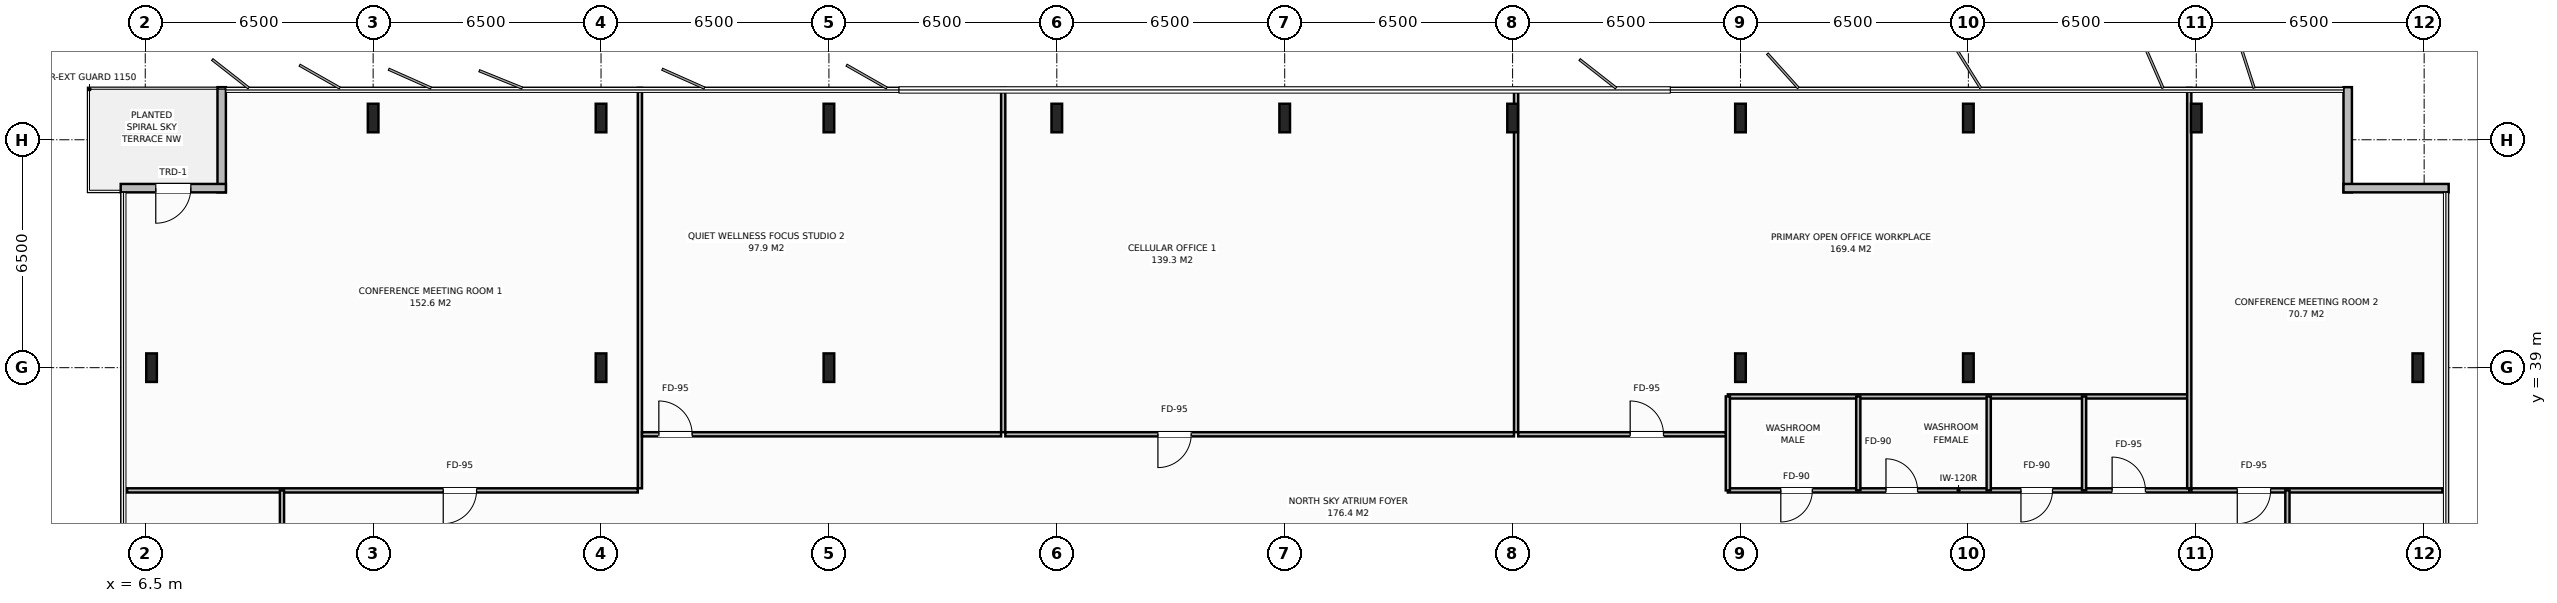
"""IFC4 building model, lengths in metres.
Left out: names, types, materials, properties, quantities, classifications, styles, units other than length and angle.
Written with IfcOpenShell. Run it as: python <this file> out.ifc"""

import sys

from ifc_helpers import new_model, si_unit, direction, frame, frame_2d, origin, origin_2d, place, context, subcontext, project, spatial, rectangle, i_section, extrude, element, fill, save


model = new_model("IFC4")
c1 = context("Model", 3, precision=1e-05, world=origin(), true_north=direction((0.0, 1.0)))
c2 = subcontext(c1, "Body", "Model", "MODEL_VIEW")
j1 = project(units=[si_unit("LENGTHUNIT", "METRE"), si_unit("PLANEANGLEUNIT", "RADIAN")], contexts=[c1])
p1 = place(None, origin())
s1 = spatial("IfcSite", under=j1, at=p1, CompositionType="ELEMENT")
p2 = place(p1, origin())
s2 = spatial("IfcBuilding", under=s1, at=p2, CompositionType="ELEMENT")
p3 = place(p2, frame((0.0, 0.0, 210.0)))
s3 = spatial("IfcBuildingStorey", under=s2, at=p3, CompositionType="ELEMENT", Elevation=210.0)
for number, where, z_axis, x_axis in (
    (1, (19.5, 39.0, 0.0), (0.0, 0.0, 1.0), (1.0, 0.0, 0.0)),
    (2, (58.5, 39.0, 0.0), (0.0, 0.0, 1.0), (1.0, 0.0, 0.0)),
    (3, (26.0, 39.0, 0.0), (0.0, 0.0, 1.0), (1.0, 0.0, 0.0)),
    (4, (52.0, 39.0, 0.0), (0.0, 0.0, 1.0), (1.0, 0.0, 0.0)),
    (5, (13.0, 46.12, 0.0), (0.0, 0.0, 1.0), (1.0, 0.0, 0.0)),
    (6, (19.5, 46.12, 0.0), (0.0, 0.0, 1.0), (1.0, 0.0, 0.0)),
    (7, (26.0, 46.12, 0.0), (0.0, 0.0, 1.0), (1.0, 0.0, 0.0)),
    (8, (32.5, 46.12, 0.0), (0.0, 0.0, 1.0), (1.0, 0.0, 0.0)),
    (9, (39.0, 46.12, 0.0), (0.0, 0.0, 1.0), (1.0, 0.0, 0.0)),
    (10, (45.5, 46.12, 0.0), (0.0, 0.0, 1.0), (1.0, 0.0, 0.0)),
    (11, (52.0, 46.12, 0.0), (0.0, 0.0, 1.0), (1.0, 0.0, 0.0)),
    (12, (58.5, 46.12, 0.0), (0.0, 0.0, 1.0), (1.0, 0.0, 0.0)),
    (13, (65.0, 46.12, 0.0), (0.0, 0.0, 1.0), (1.0, 0.0, 0.0)),
    (14, (6.68, 39.0, 0.0), (0.0, 0.0, 1.0), (1.0, 0.0, 0.0)),
    (15, (71.32, 39.0, 0.0), (0.0, 0.0, 1.0), (1.0, 0.0, 0.0)),
):
    element("IfcColumn", number, at=place(p3, frame(where, z_axis=z_axis, x_axis=x_axis)), inside=s3, PredefinedType="COLUMN", context=c2, shape_type="SweptSolid", body=[
        extrude(i_section(OverallWidth=0.303, OverallDepth=0.814, WebThickness=0.021, FlangeThickness=0.04, at=origin_2d()), origin(), (0.0, 0.0, 1.0), 3.8),
    ])
p4 = place(p3, frame((8.68, 44.0, 0.0), z_axis=(0.0, 0.0, 1.0), x_axis=(0.0, 1.0, 0.0)))
e16 = element("IfcWall", 16, at=p4, inside=s3, PredefinedType="STANDARD", context=c2, shape_type="SweptSolid", body=[
    extrude(rectangle(XDim=3.0, YDim=0.24, at=frame_2d((1.5, 0.0))), origin(), (0.0, 0.0, 1.0), 3.58),
])
p5 = place(p3, frame((5.8, 44.12, 0.0), z_axis=(0.0, 0.0, 1.0), x_axis=(1.0, 0.0, 0.0)))
e17 = element("IfcWall", 17, at=p5, inside=s3, PredefinedType="STANDARD", context=c2, shape_type="SweptSolid", body=[
    extrude(rectangle(XDim=3.0, YDim=0.24, at=frame_2d((1.5, 0.0))), origin(), (0.0, 0.0, 1.0), 3.58),
])
p6 = place(p5, frame((1.0, 0.0, 0.0)))
e18 = element("IfcOpeningElement", 18, at=p6, cuts=e17, PredefinedType="OPENING", context=c2, shape_type="SweptSolid", body=[
    extrude(rectangle(XDim=1.0, YDim=2.2, at=frame_2d((0.5, 1.1))), frame((0.0, 0.13, 0.0), z_axis=(0.0, -1.0, 0.0), x_axis=(1.0, 0.0, 0.0)), (0.0, 0.0, 1.0), 0.26),
])
for number, where, z_axis, x_axis in (
    (19, (69.32, 47.0, 0.0), (0.0, 0.0, 1.0), (0.0, -1.0, 0.0)),
    (20, (69.2, 44.12, 0.0), (0.0, 0.0, 1.0), (1.0, 0.0, 0.0)),
):
    element("IfcWall", number, at=place(p3, frame(where, z_axis=z_axis, x_axis=x_axis)), inside=s3, PredefinedType="STANDARD", context=c2, shape_type="SweptSolid", body=[
        extrude(rectangle(XDim=3.0, YDim=0.24, at=frame_2d((1.5, 0.0))), origin(), (0.0, 0.0, 1.0), 3.58),
    ])
p7 = place(p3, frame((51.64, 35.5, 0.0), z_axis=(0.0, 0.0, 1.0), x_axis=(1.0, 0.0, 0.0)))
e21 = element("IfcWall", 21, at=p7, inside=s3, PredefinedType="PARTITIONING", context=c2, shape_type="SweptSolid", body=[
    extrude(rectangle(XDim=13.16, YDim=0.12, at=frame_2d((6.58, 0.0))), origin(), (0.0, 0.0, 1.0), 3.58),
])
p8 = place(p7, frame((1.51, 0.0, 0.0)))
e22 = element("IfcOpeningElement", 22, at=p8, cuts=e21, PredefinedType="OPENING", context=c2, shape_type="SweptSolid", body=[
    extrude(rectangle(XDim=0.9, YDim=2.15, at=frame_2d((0.45, 1.075))), frame((0.0, 0.07, 0.0), z_axis=(0.0, -1.0, 0.0), x_axis=(1.0, 0.0, 0.0)), (0.0, 0.0, 1.0), 0.14),
])
p9 = place(p7, frame((4.51, 0.0, 0.0)))
e23 = element("IfcOpeningElement", 23, at=p9, cuts=e21, PredefinedType="OPENING", context=c2, shape_type="SweptSolid", body=[
    extrude(rectangle(XDim=0.9, YDim=2.15, at=frame_2d((0.45, 1.075))), frame((0.0, 0.07, 0.0), z_axis=(0.0, -1.0, 0.0), x_axis=(1.0, 0.0, 0.0)), (0.0, 0.0, 1.0), 0.14),
])
p10 = place(p7, frame((8.36, 0.0, 0.0)))
e24 = element("IfcOpeningElement", 24, at=p10, cuts=e21, PredefinedType="OPENING", context=c2, shape_type="SweptSolid", body=[
    extrude(rectangle(XDim=0.9, YDim=2.15, at=frame_2d((0.45, 1.075))), frame((0.0, 0.07, 0.0), z_axis=(0.0, -1.0, 0.0), x_axis=(1.0, 0.0, 0.0)), (0.0, 0.0, 1.0), 0.14),
])
p11 = place(p7, frame((10.96, 0.0, 0.0)))
e25 = element("IfcOpeningElement", 25, at=p11, cuts=e21, PredefinedType="OPENING", context=c2, shape_type="SweptSolid", body=[
    extrude(rectangle(XDim=0.95, YDim=2.15, at=frame_2d((0.475, 1.075))), frame((0.0, 0.07, 0.0), z_axis=(0.0, -1.0, 0.0), x_axis=(1.0, 0.0, 0.0)), (0.0, 0.0, 1.0), 0.14),
])
p12 = place(p3, frame((51.64, 38.18, 0.0), z_axis=(0.0, 0.0, 1.0), x_axis=(1.0, 0.0, 0.0)))
e26 = element("IfcWall", 26, at=p12, inside=s3, PredefinedType="PARTITIONING", context=c2, shape_type="SweptSolid", body=[
    extrude(rectangle(XDim=13.16, YDim=0.12, at=frame_2d((6.58, 0.0))), origin(), (0.0, 0.0, 1.0), 3.58),
])
for number, where, z_axis, x_axis in (
    (27, (51.64, 35.5, 0.0), (0.0, 0.0, 1.0), (0.0, 1.0, 0.0)),
    (28, (55.36, 35.5, 0.0), (0.0, 0.0, 1.0), (0.0, 1.0, 0.0)),
    (29, (59.08, 35.5, 0.0), (0.0, 0.0, 1.0), (0.0, 1.0, 0.0)),
    (30, (61.8, 35.5, 0.0), (0.0, 0.0, 1.0), (0.0, 1.0, 0.0)),
):
    element("IfcWall", number, at=place(p3, frame(where, z_axis=z_axis, x_axis=x_axis)), inside=s3, PredefinedType="PARTITIONING", context=c2, shape_type="SweptSolid", body=[
        extrude(rectangle(XDim=2.68, YDim=0.12, at=frame_2d((1.34, 0.0))), origin(), (0.0, 0.0, 1.0), 3.58),
    ])
p13 = place(p3, frame((20.609, 35.56, 0.0), z_axis=(0.0, 0.0, 1.0), x_axis=(0.0, 1.0, 0.0)))
e31 = element("IfcWall", 31, at=p13, inside=s3, PredefinedType="PARTITIONING", context=c2, shape_type="SweptSolid", body=[
    extrude(rectangle(XDim=11.42, YDim=0.12, at=frame_2d((5.71, 0.0))), origin(), (0.0, 0.0, 1.0), 3.58),
])
p14 = place(p3, frame((5.98, 35.5, 0.0), z_axis=(0.0, 0.0, 1.0), x_axis=(1.0, 0.0, 0.0)))
e32 = element("IfcWall", 32, at=p14, inside=s3, PredefinedType="PARTITIONING", context=c2, shape_type="SweptSolid", body=[
    extrude(rectangle(XDim=14.569, YDim=0.12, at=frame_2d((7.284, 0.0))), origin(), (0.0, 0.0, 1.0), 3.58),
])
p15 = place(p14, frame((9.02, 0.0, 0.0)))
e33 = element("IfcOpeningElement", 33, at=p15, cuts=e32, PredefinedType="OPENING", context=c2, shape_type="SweptSolid", body=[
    extrude(rectangle(XDim=0.95, YDim=2.15, at=frame_2d((0.475, 1.075))), frame((0.0, 0.07, 0.0), z_axis=(0.0, -1.0, 0.0), x_axis=(1.0, 0.0, 0.0)), (0.0, 0.0, 1.0), 0.14),
])
p16 = place(p3, frame((30.971, 37.16, 0.0), z_axis=(0.0, 0.0, 1.0), x_axis=(0.0, 1.0, 0.0)))
e34 = element("IfcWall", 34, at=p16, inside=s3, PredefinedType="PARTITIONING", context=c2, shape_type="SweptSolid", body=[
    extrude(rectangle(XDim=9.82, YDim=0.12, at=frame_2d((4.91, 0.0))), origin(), (0.0, 0.0, 1.0), 3.58),
])
p17 = place(p3, frame((20.669, 37.1, 0.0), z_axis=(0.0, 0.0, 1.0), x_axis=(1.0, 0.0, 0.0)))
e35 = element("IfcWall", 35, at=p17, inside=s3, PredefinedType="PARTITIONING", context=c2, shape_type="SweptSolid", body=[
    extrude(rectangle(XDim=10.242, YDim=0.12, at=frame_2d((5.121, 0.0))), origin(), (0.0, 0.0, 1.0), 3.58),
])
p18 = place(p17, frame((0.48, 0.0, 0.0)))
e36 = element("IfcOpeningElement", 36, at=p18, cuts=e35, PredefinedType="OPENING", context=c2, shape_type="SweptSolid", body=[
    extrude(rectangle(XDim=0.95, YDim=2.15, at=frame_2d((0.475, 1.075))), frame((0.0, 0.07, 0.0), z_axis=(0.0, -1.0, 0.0), x_axis=(1.0, 0.0, 0.0)), (0.0, 0.0, 1.0), 0.14),
])
p19 = place(p3, frame((45.6, 37.16, 0.0), z_axis=(0.0, 0.0, 1.0), x_axis=(0.0, 1.0, 0.0)))
e37 = element("IfcWall", 37, at=p19, inside=s3, PredefinedType="PARTITIONING", context=c2, shape_type="SweptSolid", body=[
    extrude(rectangle(XDim=9.82, YDim=0.12, at=frame_2d((4.91, 0.0))), origin(), (0.0, 0.0, 1.0), 2.88),
])
p20 = place(p3, frame((31.031, 37.1, 0.0), z_axis=(0.0, 0.0, 1.0), x_axis=(1.0, 0.0, 0.0)))
e38 = element("IfcWall", 38, at=p20, inside=s3, PredefinedType="PARTITIONING", context=c2, shape_type="SweptSolid", body=[
    extrude(rectangle(XDim=14.509, YDim=0.12, at=frame_2d((7.254, 0.0))), origin(), (0.0, 0.0, 1.0), 3.58),
])
p21 = place(p20, frame((4.353, 0.0, 0.0)))
e39 = element("IfcOpeningElement", 39, at=p21, cuts=e38, PredefinedType="OPENING", context=c2, shape_type="SweptSolid", body=[
    extrude(rectangle(XDim=0.95, YDim=2.15, at=frame_2d((0.475, 1.075))), frame((0.0, 0.07, 0.0), z_axis=(0.0, -1.0, 0.0), x_axis=(1.0, 0.0, 0.0)), (0.0, 0.0, 1.0), 0.14),
])
p22 = place(p3, frame((64.8, 35.56, 0.0), z_axis=(0.0, 0.0, 1.0), x_axis=(0.0, 1.0, 0.0)))
e40 = element("IfcWall", 40, at=p22, inside=s3, PredefinedType="PARTITIONING", context=c2, shape_type="SweptSolid", body=[
    extrude(rectangle(XDim=11.42, YDim=0.12, at=frame_2d((5.71, 0.0))), origin(), (0.0, 0.0, 1.0), 2.88),
])
p23 = place(p3, frame((45.66, 37.1, 0.0), z_axis=(0.0, 0.0, 1.0), x_axis=(1.0, 0.0, 0.0)))
e41 = element("IfcWall", 41, at=p23, inside=s3, PredefinedType="PARTITIONING", context=c2, shape_type="SweptSolid", body=[
    extrude(rectangle(XDim=5.92, YDim=0.12, at=frame_2d((2.96, 0.0))), origin(), (0.0, 0.0, 1.0), 3.58),
])
p24 = place(p23, frame((3.194, 0.0, 0.0)))
e42 = element("IfcOpeningElement", 42, at=p24, cuts=e41, PredefinedType="OPENING", context=c2, shape_type="SweptSolid", body=[
    extrude(rectangle(XDim=0.95, YDim=2.15, at=frame_2d((0.475, 1.075))), frame((0.0, 0.07, 0.0), z_axis=(0.0, -1.0, 0.0), x_axis=(1.0, 0.0, 0.0)), (0.0, 0.0, 1.0), 0.14),
])
p25 = place(p3, frame((64.86, 35.5, 0.0), z_axis=(0.0, 0.0, 1.0), x_axis=(1.0, 0.0, 0.0)))
e43 = element("IfcWall", 43, at=p25, inside=s3, PredefinedType="PARTITIONING", context=c2, shape_type="SweptSolid", body=[
    extrude(rectangle(XDim=7.16, YDim=0.12, at=frame_2d((3.58, 0.0))), origin(), (0.0, 0.0, 1.0), 3.58),
])
p26 = place(p25, frame((1.31, 0.0, 0.0)))
e44 = element("IfcOpeningElement", 44, at=p26, cuts=e43, PredefinedType="OPENING", context=c2, shape_type="SweptSolid", body=[
    extrude(rectangle(XDim=0.95, YDim=2.15, at=frame_2d((0.475, 1.075))), frame((0.0, 0.07, 0.0), z_axis=(0.0, -1.0, 0.0), x_axis=(1.0, 0.0, 0.0)), (0.0, 0.0, 1.0), 0.14),
])
p27 = place(p3, frame((10.4, 16.5, 0.0), z_axis=(0.0, 0.0, 1.0), x_axis=(0.0, 1.0, 0.0)))
e45 = element("IfcWall", 45, at=p27, inside=s3, PredefinedType="PARTITIONING", context=c2, shape_type="SweptSolid", body=[
    extrude(rectangle(XDim=19.0, YDim=0.12, at=frame_2d((9.5, 0.0))), origin(), (0.0, 0.0, 1.0), 3.58),
])
p28 = place(p27, frame((9.025, 0.0, 0.0)))
e46 = element("IfcOpeningElement", 46, at=p28, cuts=e45, PredefinedType="OPENING", context=c2, shape_type="SweptSolid", body=[
    extrude(rectangle(XDim=0.95, YDim=2.15, at=frame_2d((0.475, 1.075))), frame((0.0, 0.07, 0.0), z_axis=(0.0, -1.0, 0.0), x_axis=(1.0, 0.0, 0.0)), (0.0, 0.0, 1.0), 0.14),
])
p29 = place(p3, frame((67.6, 26.0, 0.0), z_axis=(0.0, 0.0, 1.0), x_axis=(0.0, 1.0, 0.0)))
e47 = element("IfcWall", 47, at=p29, inside=s3, PredefinedType="PARTITIONING", context=c2, shape_type="SweptSolid", body=[
    extrude(rectangle(XDim=9.5, YDim=0.12, at=frame_2d((4.75, 0.0))), origin(), (0.0, 0.0, 1.0), 3.58),
])
p30 = place(p29, frame((3.225, 0.0, 0.0)))
e48 = element("IfcOpeningElement", 48, at=p30, cuts=e47, PredefinedType="OPENING", context=c2, shape_type="SweptSolid", body=[
    extrude(rectangle(XDim=0.95, YDim=2.15, at=frame_2d((0.475, 1.075))), frame((0.0, 0.07, 0.0), z_axis=(0.0, -1.0, 0.0), x_axis=(1.0, 0.0, 0.0)), (0.0, 0.0, 1.0), 0.14),
])
p31 = place(p6, origin())
e49 = element("IfcDoor", 49, at=p31, inside=s3, OperationType="SINGLE_SWING_RIGHT", PredefinedType="DOOR", context=c2, shape_type="SweptSolid", body=[
    extrude(rectangle(XDim=1.0, YDim=2.2, at=frame_2d((0.5, 1.1))), frame((0.0, 0.025, 0.0), z_axis=(0.0, -1.0, 0.0), x_axis=(1.0, 0.0, 0.0)), (0.0, 0.0, 1.0), 0.05),
])
fill(e18, e49)
p32 = place(p8, origin())
e50 = element("IfcDoor", 50, at=p32, inside=s3, OperationType="SINGLE_SWING_RIGHT", PredefinedType="DOOR", context=c2, shape_type="SweptSolid", body=[
    extrude(rectangle(XDim=0.9, YDim=2.15, at=frame_2d((0.45, 1.075))), frame((0.0, 0.025, 0.0), z_axis=(0.0, -1.0, 0.0), x_axis=(1.0, 0.0, 0.0)), (0.0, 0.0, 1.0), 0.05),
])
fill(e22, e50)
p33 = place(p9, origin())
e51 = element("IfcDoor", 51, at=p33, inside=s3, OperationType="SINGLE_SWING_LEFT", PredefinedType="DOOR", context=c2, shape_type="SweptSolid", body=[
    extrude(rectangle(XDim=0.9, YDim=2.15, at=frame_2d((0.45, 1.075))), frame((0.0, 0.025, 0.0), z_axis=(0.0, -1.0, 0.0), x_axis=(1.0, 0.0, 0.0)), (0.0, 0.0, 1.0), 0.05),
])
fill(e23, e51)
p34 = place(p10, origin())
e52 = element("IfcDoor", 52, at=p34, inside=s3, OperationType="SINGLE_SWING_RIGHT", PredefinedType="DOOR", context=c2, shape_type="SweptSolid", body=[
    extrude(rectangle(XDim=0.9, YDim=2.15, at=frame_2d((0.45, 1.075))), frame((0.0, 0.025, 0.0), z_axis=(0.0, -1.0, 0.0), x_axis=(1.0, 0.0, 0.0)), (0.0, 0.0, 1.0), 0.05),
])
fill(e24, e52)
p35 = place(p11, origin())
e53 = element("IfcDoor", 53, at=p35, inside=s3, OperationType="SINGLE_SWING_LEFT", PredefinedType="DOOR", context=c2, shape_type="SweptSolid", body=[
    extrude(rectangle(XDim=0.95, YDim=2.15, at=frame_2d((0.475, 1.075))), frame((0.0, 0.025, 0.0), z_axis=(0.0, -1.0, 0.0), x_axis=(1.0, 0.0, 0.0)), (0.0, 0.0, 1.0), 0.05),
])
fill(e25, e53)
p36 = place(p15, origin())
e54 = element("IfcDoor", 54, at=p36, inside=s3, OperationType="SINGLE_SWING_RIGHT", PredefinedType="DOOR", context=c2, shape_type="SweptSolid", body=[
    extrude(rectangle(XDim=0.95, YDim=2.15, at=frame_2d((0.475, 1.075))), frame((0.0, 0.025, 0.0), z_axis=(0.0, -1.0, 0.0), x_axis=(1.0, 0.0, 0.0)), (0.0, 0.0, 1.0), 0.05),
])
fill(e33, e54)
p37 = place(p18, origin())
e55 = element("IfcDoor", 55, at=p37, inside=s3, OperationType="SINGLE_SWING_LEFT", PredefinedType="DOOR", context=c2, shape_type="SweptSolid", body=[
    extrude(rectangle(XDim=0.95, YDim=2.15, at=frame_2d((0.475, 1.075))), frame((0.0, 0.025, 0.0), z_axis=(0.0, -1.0, 0.0), x_axis=(1.0, 0.0, 0.0)), (0.0, 0.0, 1.0), 0.05),
])
fill(e36, e55)
p38 = place(p21, origin())
e56 = element("IfcDoor", 56, at=p38, inside=s3, OperationType="SINGLE_SWING_RIGHT", PredefinedType="DOOR", context=c2, shape_type="SweptSolid", body=[
    extrude(rectangle(XDim=0.95, YDim=2.15, at=frame_2d((0.475, 1.075))), frame((0.0, 0.025, 0.0), z_axis=(0.0, -1.0, 0.0), x_axis=(1.0, 0.0, 0.0)), (0.0, 0.0, 1.0), 0.05),
])
fill(e39, e56)
p39 = place(p24, origin())
e57 = element("IfcDoor", 57, at=p39, inside=s3, OperationType="SINGLE_SWING_LEFT", PredefinedType="DOOR", context=c2, shape_type="SweptSolid", body=[
    extrude(rectangle(XDim=0.95, YDim=2.15, at=frame_2d((0.475, 1.075))), frame((0.0, 0.025, 0.0), z_axis=(0.0, -1.0, 0.0), x_axis=(1.0, 0.0, 0.0)), (0.0, 0.0, 1.0), 0.05),
])
fill(e42, e57)
p40 = place(p26, origin())
e58 = element("IfcDoor", 58, at=p40, inside=s3, OperationType="SINGLE_SWING_RIGHT", PredefinedType="DOOR", context=c2, shape_type="SweptSolid", body=[
    extrude(rectangle(XDim=0.95, YDim=2.15, at=frame_2d((0.475, 1.075))), frame((0.0, 0.025, 0.0), z_axis=(0.0, -1.0, 0.0), x_axis=(1.0, 0.0, 0.0)), (0.0, 0.0, 1.0), 0.05),
])
fill(e44, e58)
save(model, sys.argv[1])
